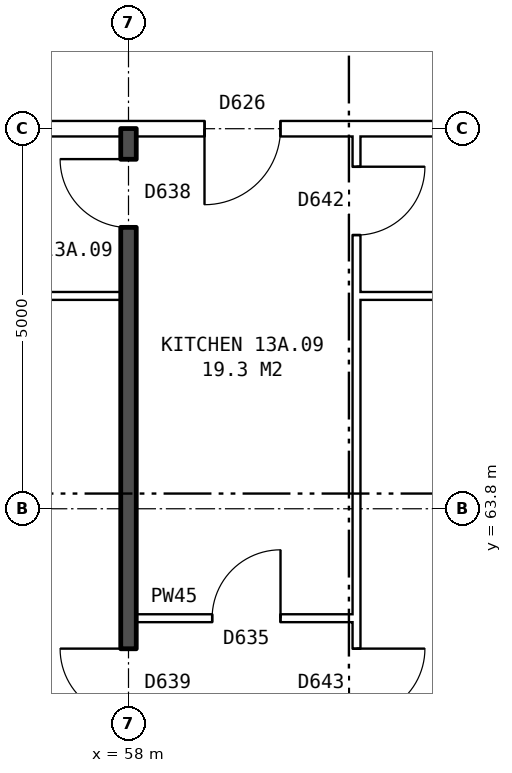
"""IFC4 building model, lengths in metres.
Left out: names, types, materials, properties, quantities, classifications, styles, units other than length and angle.
Written with IfcOpenShell. Run it as: python <this file> out.ifc"""

import sys

from ifc_helpers import new_model, si_unit, direction, frame, frame_2d, origin, place, context, subcontext, project, spatial, rectangle, extrude, element, fill, save


model = new_model("IFC4")
c1 = context("Model", 3, precision=1e-05, world=origin(), true_north=direction((0.0, 1.0)))
c2 = subcontext(c1, "Body", "Model", "MODEL_VIEW")
j1 = project(units=[si_unit("LENGTHUNIT", "METRE"), si_unit("PLANEANGLEUNIT", "RADIAN")], contexts=[c1])
p1 = place(None, origin())
s1 = spatial("IfcSite", under=j1, at=p1, CompositionType="ELEMENT")
p2 = place(p1, origin())
s2 = spatial("IfcBuilding", under=s1, at=p2, CompositionType="ELEMENT")
p3 = place(p2, frame((0.0, 0.0, 50.5)))
s3 = spatial("IfcBuildingStorey", under=s2, at=p3, CompositionType="ELEMENT", Elevation=50.5)
p4 = place(p3, frame((58.1, 62.36, 0.0), z_axis=(0.0, 0.0, 1.0), x_axis=(1.0, 0.0, 0.0)))
e1 = element("IfcWall", 1, at=p4, inside=s3, PredefinedType="PARTITIONING", context=c2, shape_type="SweptSolid", body=[
    extrude(rectangle(XDim=2.9, YDim=0.1, at=frame_2d((1.45, 0.0))), origin(), (0.0, 0.0, 1.0), 2.85),
])
p5 = place(p4, frame((1.0, 0.0, 0.0)))
e2 = element("IfcOpeningElement", 2, at=p5, cuts=e1, PredefinedType="OPENING", context=c2, shape_type="SweptSolid", body=[
    extrude(rectangle(XDim=0.9, YDim=2.1, at=frame_2d((0.45, 1.05))), frame((0.0, 0.06, 0.0), z_axis=(0.0, -1.0, 0.0), x_axis=(1.0, 0.0, 0.0)), (0.0, 0.0, 1.0), 0.12),
])
p6 = place(p3, frame((52.1, 66.6, 0.0), z_axis=(0.0, 0.0, 1.0), x_axis=(1.0, 0.0, 0.0)))
e3 = element("IfcWall", 3, at=p6, inside=s3, PredefinedType="PARTITIONING", context=c2, shape_type="SweptSolid", body=[
    extrude(rectangle(XDim=5.8, YDim=0.1, at=frame_2d((2.9, 0.0))), origin(), (0.0, 0.0, 1.0), 2.85),
])
p7 = place(p3, frame((61.0, 66.6, 0.0), z_axis=(0.0, 0.0, 1.0), x_axis=(1.0, 0.0, 0.0)))
e4 = element("IfcWall", 4, at=p7, inside=s3, PredefinedType="PARTITIONING", context=c2, shape_type="SweptSolid", body=[
    extrude(rectangle(XDim=2.64, YDim=0.1, at=frame_2d((1.32, 0.0))), origin(), (0.0, 0.0, 1.0), 2.85),
])
p8 = place(p3, frame((44.36, 68.8, 0.0), z_axis=(0.0, 0.0, 1.0), x_axis=(1.0, 0.0, 0.0)))
e5 = element("IfcWall", 5, at=p8, inside=s3, PredefinedType="PARTITIONING", context=c2, shape_type="SweptSolid", body=[
    extrude(rectangle(XDim=19.28, YDim=0.2, at=frame_2d((9.64, 0.0))), origin(), (0.0, 0.0, 1.0), 2.85),
])
p9 = place(p8, frame((14.64, 0.0, 0.0)))
e6 = element("IfcOpeningElement", 6, at=p9, cuts=e5, PredefinedType="OPENING", context=c2, shape_type="SweptSolid", body=[
    extrude(rectangle(XDim=1.0, YDim=2.1, at=frame_2d((0.5, 1.05))), frame((0.0, 0.11, 0.0), z_axis=(0.0, -1.0, 0.0), x_axis=(1.0, 0.0, 0.0)), (0.0, 0.0, 1.0), 0.22),
])
p10 = place(p8, frame((5.64, 0.0, 0.0)))
e7 = element("IfcOpeningElement", 7, at=p10, cuts=e5, PredefinedType="OPENING", context=c2, shape_type="SweptSolid", body=[
    extrude(rectangle(XDim=1.0, YDim=2.1, at=frame_2d((0.5, 1.05))), frame((0.0, 0.11, 0.0), z_axis=(0.0, -1.0, 0.0), x_axis=(1.0, 0.0, 0.0)), (0.0, 0.0, 1.0), 0.22),
])
p11 = place(p3, frame((58.0, 54.36, 0.0), z_axis=(0.0, 0.0, 1.0), x_axis=(0.0, 1.0, 0.0)))
e8 = element("IfcWall", 8, at=p11, inside=s3, PredefinedType="SOLIDWALL", context=c2, shape_type="SweptSolid", body=[
    extrude(rectangle(XDim=14.44, YDim=0.2, at=frame_2d((7.22, 0.0))), origin(), (0.0, 0.0, 1.0), 2.85),
])
p12 = place(p11, frame((6.7, 0.0, 0.0)))
e9 = element("IfcOpeningElement", 9, at=p12, cuts=e8, PredefinedType="OPENING", context=c2, shape_type="SweptSolid", body=[
    extrude(rectangle(XDim=0.9, YDim=2.1, at=frame_2d((0.45, 1.05))), frame((0.0, 0.11, 0.0), z_axis=(0.0, -1.0, 0.0), x_axis=(1.0, 0.0, 0.0)), (0.0, 0.0, 1.0), 0.22),
])
p13 = place(p11, frame((13.14, 0.0, 0.0)))
e10 = element("IfcOpeningElement", 10, at=p13, cuts=e8, PredefinedType="OPENING", context=c2, shape_type="SweptSolid", body=[
    extrude(rectangle(XDim=0.9, YDim=2.1, at=frame_2d((0.45, 1.05))), frame((0.0, 0.11, 0.0), z_axis=(0.0, -1.0, 0.0), x_axis=(1.0, 0.0, 0.0)), (0.0, 0.0, 1.0), 0.22),
])
p14 = place(p3, frame((61.0, 54.36, 0.0), z_axis=(0.0, 0.0, 1.0), x_axis=(0.0, 1.0, 0.0)))
e11 = element("IfcWall", 11, at=p14, inside=s3, PredefinedType="PARTITIONING", context=c2, shape_type="SweptSolid", body=[
    extrude(rectangle(XDim=14.34, YDim=0.1, at=frame_2d((7.17, 0.0))), origin(), (0.0, 0.0, 1.0), 2.85),
])
p15 = place(p14, frame((6.7, 0.0, 0.0)))
e12 = element("IfcOpeningElement", 12, at=p15, cuts=e11, PredefinedType="OPENING", context=c2, shape_type="SweptSolid", body=[
    extrude(rectangle(XDim=0.9, YDim=2.1, at=frame_2d((0.45, 1.05))), frame((0.0, 0.06, 0.0), z_axis=(0.0, -1.0, 0.0), x_axis=(1.0, 0.0, 0.0)), (0.0, 0.0, 1.0), 0.12),
])
p16 = place(p14, frame((13.04, 0.0, 0.0)))
e13 = element("IfcOpeningElement", 13, at=p16, cuts=e11, PredefinedType="OPENING", context=c2, shape_type="SweptSolid", body=[
    extrude(rectangle(XDim=0.9, YDim=2.1, at=frame_2d((0.45, 1.05))), frame((0.0, 0.06, 0.0), z_axis=(0.0, -1.0, 0.0), x_axis=(1.0, 0.0, 0.0)), (0.0, 0.0, 1.0), 0.12),
])
p17 = place(p15, frame((0.9, 0.0, 0.0), z_axis=(0.0, 0.0, 1.0), x_axis=(-1.0, 0.0, 0.0)))
e14 = element("IfcDoor", 14, at=p17, inside=s3, OperationType="SINGLE_SWING_LEFT", PredefinedType="DOOR", context=c2, shape_type="SweptSolid", body=[
    extrude(rectangle(XDim=0.9, YDim=2.1, at=frame_2d((0.45, 1.05))), frame((0.0, 0.025, 0.0), z_axis=(0.0, -1.0, 0.0), x_axis=(1.0, 0.0, 0.0)), (0.0, 0.0, 1.0), 0.05),
])
fill(e12, e14)
p18 = place(p12, origin())
e15 = element("IfcDoor", 15, at=p18, inside=s3, OperationType="SINGLE_SWING_RIGHT", PredefinedType="DOOR", context=c2, shape_type="SweptSolid", body=[
    extrude(rectangle(XDim=0.9, YDim=2.1, at=frame_2d((0.45, 1.05))), frame((0.0, 0.025, 0.0), z_axis=(0.0, -1.0, 0.0), x_axis=(1.0, 0.0, 0.0)), (0.0, 0.0, 1.0), 0.05),
])
fill(e9, e15)
p19 = place(p9, frame((1.0, 0.0, 0.0), z_axis=(0.0, 0.0, 1.0), x_axis=(-1.0, 0.0, 0.0)))
e16 = element("IfcDoor", 16, at=p19, inside=s3, OperationType="SINGLE_SWING_RIGHT", PredefinedType="DOOR", context=c2, shape_type="SweptSolid", body=[
    extrude(rectangle(XDim=1.0, YDim=2.1, at=frame_2d((0.5, 1.05))), frame((0.0, 0.025, 0.0), z_axis=(0.0, -1.0, 0.0), x_axis=(1.0, 0.0, 0.0)), (0.0, 0.0, 1.0), 0.05),
])
fill(e6, e16)
p20 = place(p5, origin())
e17 = element("IfcDoor", 17, at=p20, inside=s3, OperationType="SINGLE_SWING_RIGHT", PredefinedType="DOOR", context=c2, shape_type="SweptSolid", body=[
    extrude(rectangle(XDim=0.9, YDim=2.1, at=frame_2d((0.45, 1.05))), frame((0.0, 0.025, 0.0), z_axis=(0.0, -1.0, 0.0), x_axis=(1.0, 0.0, 0.0)), (0.0, 0.0, 1.0), 0.05),
])
fill(e2, e17)
p21 = place(p16, frame((0.9, 0.0, 0.0), z_axis=(0.0, 0.0, 1.0), x_axis=(-1.0, 0.0, 0.0)))
e18 = element("IfcDoor", 18, at=p21, inside=s3, OperationType="SINGLE_SWING_LEFT", PredefinedType="DOOR", context=c2, shape_type="SweptSolid", body=[
    extrude(rectangle(XDim=0.9, YDim=2.1, at=frame_2d((0.45, 1.05))), frame((0.0, 0.025, 0.0), z_axis=(0.0, -1.0, 0.0), x_axis=(1.0, 0.0, 0.0)), (0.0, 0.0, 1.0), 0.05),
])
fill(e13, e18)
p22 = place(p13, origin())
e19 = element("IfcDoor", 19, at=p22, inside=s3, OperationType="SINGLE_SWING_RIGHT", PredefinedType="DOOR", context=c2, shape_type="SweptSolid", body=[
    extrude(rectangle(XDim=0.9, YDim=2.1, at=frame_2d((0.45, 1.05))), frame((0.0, 0.025, 0.0), z_axis=(0.0, -1.0, 0.0), x_axis=(1.0, 0.0, 0.0)), (0.0, 0.0, 1.0), 0.05),
])
fill(e10, e19)
save(model, sys.argv[1])
